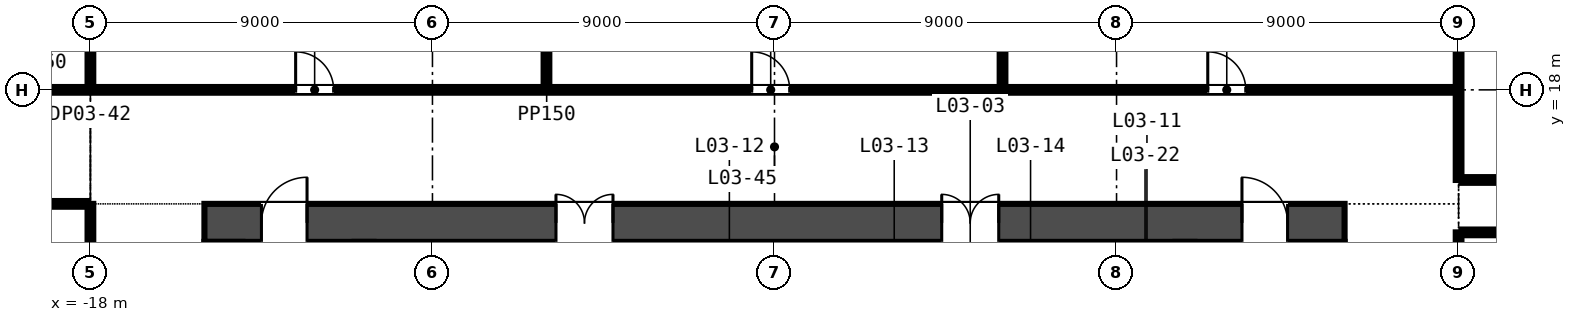
"""IFC4 building model, lengths in metres.
Left out: names, types, materials, properties, quantities, classifications, styles, units other than length and angle.
Written with IfcOpenShell. Run it as: python <this file> out.ifc"""

import sys

from ifc_helpers import new_model, si_unit, direction, frame, frame_2d, origin, place, context, subcontext, project, spatial, rectangle, extrude, element, fill, save


model = new_model("IFC4")
c1 = context("Model", 3, precision=1e-05, world=origin(), true_north=direction((0.0, 1.0)))
c2 = subcontext(c1, "Body", "Model", "MODEL_VIEW")
j1 = project(units=[si_unit("LENGTHUNIT", "METRE"), si_unit("PLANEANGLEUNIT", "RADIAN")], contexts=[c1])
p1 = place(None, origin())
s1 = spatial("IfcSite", under=j1, at=p1, CompositionType="ELEMENT")
p2 = place(p1, origin())
s2 = spatial("IfcBuilding", under=s1, at=p2, CompositionType="ELEMENT")
p3 = place(p2, frame((0.0, 0.0, 22.5)))
s3 = spatial("IfcBuildingStorey", under=s2, at=p3, CompositionType="ELEMENT", Elevation=22.5)
p4 = place(p3, frame((-15.0, 14.5, -0.3), z_axis=(0.0, 0.0, 1.0), x_axis=(1.0, 0.0, 0.0)))
e1 = element("IfcWall", 1, at=p4, inside=s3, PredefinedType="SOLIDWALL", context=c2, shape_type="SweptSolid", body=[
    extrude(rectangle(XDim=30.0, YDim=1.0, at=frame_2d((15.0, 0.0))), origin(), (0.0, 0.0, 1.0), 4.5),
])
p5 = place(p4, frame((9.25, 0.0, 0.3)))
e2 = element("IfcOpeningElement", 2, at=p5, cuts=e1, PredefinedType="OPENING", context=c2, shape_type="SweptSolid", body=[
    extrude(rectangle(XDim=1.5, YDim=2.1, at=frame_2d((0.75, 1.05))), frame((0.0, 0.51, 0.0), z_axis=(0.0, -1.0, 0.0), x_axis=(1.0, 0.0, 0.0)), (0.0, 0.0, 1.0), 1.02),
])
p6 = place(p4, frame((19.4, 0.0, 0.3)))
e3 = element("IfcOpeningElement", 3, at=p6, cuts=e1, PredefinedType="OPENING", context=c2, shape_type="SweptSolid", body=[
    extrude(rectangle(XDim=1.5, YDim=2.1, at=frame_2d((0.75, 1.05))), frame((0.0, 0.51, 0.0), z_axis=(0.0, -1.0, 0.0), x_axis=(1.0, 0.0, 0.0)), (0.0, 0.0, 1.0), 1.02),
])
p7 = place(p4, frame((1.5, 0.0, 0.3)))
e4 = element("IfcOpeningElement", 4, at=p7, cuts=e1, PredefinedType="OPENING", context=c2, shape_type="SweptSolid", body=[
    extrude(rectangle(XDim=1.2, YDim=2.1, at=frame_2d((0.6, 1.05))), frame((0.0, 0.51, 0.0), z_axis=(0.0, -1.0, 0.0), x_axis=(1.0, 0.0, 0.0)), (0.0, 0.0, 1.0), 1.02),
])
p8 = place(p4, frame((27.3, 0.0, 0.3)))
e5 = element("IfcOpeningElement", 5, at=p8, cuts=e1, PredefinedType="OPENING", context=c2, shape_type="SweptSolid", body=[
    extrude(rectangle(XDim=1.2, YDim=2.1, at=frame_2d((0.6, 1.05))), frame((0.0, 0.51, 0.0), z_axis=(0.0, -1.0, 0.0), x_axis=(1.0, 0.0, 0.0)), (0.0, 0.0, 1.0), 1.02),
])
for number, where, z_axis, x_axis in (
    (6, (-8.275, 11.3, 0.0), (0.0, 0.0, 1.0), (0.0, 1.0, 0.0)),
    (7, (-5.875, 11.3, 0.0), (0.0, 0.0, 1.0), (0.0, 1.0, 0.0)),
    (8, (-4.125, 11.3, 0.0), (0.0, 0.0, 1.0), (0.0, 1.0, 0.0)),
    (9, (-1.325, 11.3, 0.0), (0.0, 0.0, 1.0), (0.0, 1.0, 0.0)),
    (10, (1.475, 11.3, 0.0), (0.0, 0.0, 1.0), (0.0, 1.0, 0.0)),
    (11, (4.275, 11.3, 0.0), (0.0, 0.0, 1.0), (0.0, 1.0, 0.0)),
    (12, (6.025, 11.3, 0.0), (0.0, 0.0, 1.0), (0.0, 1.0, 0.0)),
    (13, (8.825, 11.3, 0.0), (0.0, 0.0, 1.0), (0.0, 1.0, 0.0)),
):
    element("IfcWall", number, at=place(p3, frame(where, z_axis=z_axis, x_axis=x_axis)), inside=s3, PredefinedType="PARTITIONING", context=c2, shape_type="SweptSolid", body=[
        extrude(rectangle(XDim=2.7, YDim=0.25, at=frame_2d((1.35, 0.0))), origin(), (0.0, 0.0, 1.0), 4.2),
    ])
p9 = place(p3, frame((18.075, 14.25, 0.0), z_axis=(0.0, 0.0, 1.0), x_axis=(1.0, 0.0, 0.0)))
e14 = element("IfcWall", 14, at=p9, inside=s3, PredefinedType="PARTITIONING", context=c2, shape_type="SweptSolid", body=[
    extrude(rectangle(XDim=5.175, YDim=0.15, at=frame_2d((2.587, 0.0))), origin(), (0.0, 0.0, 1.0), 4.2),
])
p10 = place(p3, frame((-27.035, 15.0, 0.0), z_axis=(0.0, 0.0, 1.0), x_axis=(1.0, 0.0, 0.0)))
e15 = element("IfcWall", 15, at=p10, inside=s3, PredefinedType="PARTITIONING", context=c2, shape_type="SweptSolid", body=[
    extrude(rectangle(XDim=8.96, YDim=0.15, at=frame_2d((4.48, 0.0))), origin(), (0.0, 0.0, 1.0), 4.2),
])
p11 = place(p3, frame((18.075, 15.629, 0.0), z_axis=(0.0, 0.0, 1.0), x_axis=(1.0, 0.0, 0.0)))
e16 = element("IfcWall", 16, at=p11, inside=s3, PredefinedType="PARTITIONING", context=c2, shape_type="SweptSolid", body=[
    extrude(rectangle(XDim=7.482, YDim=0.15, at=frame_2d((3.741, 0.0))), origin(), (0.0, 0.0, 1.0), 4.2),
])
p12 = place(p3, frame((-26.142, 18.0, 0.0), z_axis=(0.0, 0.0, 1.0), x_axis=(1.0, 0.0, 0.0)))
e17 = element("IfcWall", 17, at=p12, inside=s3, PredefinedType="PARTITIONING", context=c2, shape_type="SweptSolid", body=[
    extrude(rectangle(XDim=44.067, YDim=0.15, at=frame_2d((22.034, 0.0))), origin(), (0.0, 0.0, 1.0), 4.2),
])
p13 = place(p12, frame((13.542, 0.0, 0.0)))
e18 = element("IfcOpeningElement", 18, at=p13, cuts=e17, PredefinedType="OPENING", context=c2, shape_type="SweptSolid", body=[
    extrude(rectangle(XDim=1.0, YDim=2.1, at=frame_2d((0.5, 1.05))), frame((0.0, 0.085, 0.0), z_axis=(0.0, -1.0, 0.0), x_axis=(1.0, 0.0, 0.0)), (0.0, 0.0, 1.0), 0.17),
])
p14 = place(p12, frame((25.542, 0.0, 0.0)))
e19 = element("IfcOpeningElement", 19, at=p14, cuts=e17, PredefinedType="OPENING", context=c2, shape_type="SweptSolid", body=[
    extrude(rectangle(XDim=1.0, YDim=2.1, at=frame_2d((0.5, 1.05))), frame((0.0, 0.085, 0.0), z_axis=(0.0, -1.0, 0.0), x_axis=(1.0, 0.0, 0.0)), (0.0, 0.0, 1.0), 0.17),
])
p15 = place(p12, frame((37.542, 0.0, 0.0)))
e20 = element("IfcOpeningElement", 20, at=p15, cuts=e17, PredefinedType="OPENING", context=c2, shape_type="SweptSolid", body=[
    extrude(rectangle(XDim=1.0, YDim=2.1, at=frame_2d((0.5, 1.05))), frame((0.0, 0.085, 0.0), z_axis=(0.0, -1.0, 0.0), x_axis=(1.0, 0.0, 0.0)), (0.0, 0.0, 1.0), 0.17),
])
p16 = place(p3, frame((-18.0, 1.251, 0.0), z_axis=(0.0, 0.0, 1.0), x_axis=(0.0, 1.0, 0.0)))
e21 = element("IfcWall", 21, at=p16, inside=s3, PredefinedType="PARTITIONING", context=c2, shape_type="SweptSolid", body=[
    extrude(rectangle(XDim=13.749, YDim=0.15, at=frame_2d((6.875, 0.0))), origin(), (0.0, 0.0, 1.0), 4.2),
])
p17 = place(p16, frame((6.4, 0.0, 0.0)))
e22 = element("IfcOpeningElement", 22, at=p17, cuts=e21, PredefinedType="OPENING", context=c2, shape_type="SweptSolid", body=[
    extrude(rectangle(XDim=1.0, YDim=2.1, at=frame_2d((0.5, 1.05))), frame((0.0, 0.085, 0.0), z_axis=(0.0, -1.0, 0.0), x_axis=(1.0, 0.0, 0.0)), (0.0, 0.0, 1.0), 0.17),
])
p18 = place(p3, frame((-18.0, 18.075, 0.0), z_axis=(0.0, 0.0, 1.0), x_axis=(0.0, 1.0, 0.0)))
e23 = element("IfcWall", 23, at=p18, inside=s3, PredefinedType="PARTITIONING", context=c2, shape_type="SweptSolid", body=[
    extrude(rectangle(XDim=13.025, YDim=0.15, at=frame_2d((6.513, 0.0))), origin(), (0.0, 0.0, 1.0), 4.2),
])
p19 = place(p3, frame((-6.0, 18.075, 0.0), z_axis=(0.0, 0.0, 1.0), x_axis=(0.0, 1.0, 0.0)))
e24 = element("IfcWall", 24, at=p19, inside=s3, PredefinedType="PARTITIONING", context=c2, shape_type="SweptSolid", body=[
    extrude(rectangle(XDim=12.125, YDim=0.15, at=frame_2d((6.062, 0.0))), origin(), (0.0, 0.0, 1.0), 4.2),
])
p20 = place(p3, frame((6.0, 18.075, 0.0), z_axis=(0.0, 0.0, 1.0), x_axis=(0.0, 1.0, 0.0)))
e25 = element("IfcWall", 25, at=p20, inside=s3, PredefinedType="PARTITIONING", context=c2, shape_type="SweptSolid", body=[
    extrude(rectangle(XDim=13.025, YDim=0.15, at=frame_2d((6.513, 0.0))), origin(), (0.0, 0.0, 1.0), 4.2),
])
p21 = place(p3, frame((18.0, 0.0, 0.0), z_axis=(0.0, 0.0, 1.0), x_axis=(0.0, 1.0, 0.0)))
e26 = element("IfcWall", 26, at=p21, inside=s3, PredefinedType="PARTITIONING", context=c2, shape_type="SweptSolid", body=[
    extrude(rectangle(XDim=14.25, YDim=0.15, at=frame_2d((7.125, 0.0))), origin(), (0.0, 0.0, 1.0), 4.2),
])
p22 = place(p21, frame((6.65, 0.0, 0.0)))
e27 = element("IfcOpeningElement", 27, at=p22, cuts=e26, PredefinedType="OPENING", context=c2, shape_type="SweptSolid", body=[
    extrude(rectangle(XDim=1.0, YDim=2.1, at=frame_2d((0.5, 1.05))), frame((0.0, 0.085, 0.0), z_axis=(0.0, -1.0, 0.0), x_axis=(1.0, 0.0, 0.0)), (0.0, 0.0, 1.0), 0.17),
])
p23 = place(p3, frame((18.0, 15.629, 0.0), z_axis=(0.0, 0.0, 1.0), x_axis=(0.0, 1.0, 0.0)))
e28 = element("IfcWall", 28, at=p23, inside=s3, PredefinedType="PARTITIONING", context=c2, shape_type="SweptSolid", body=[
    extrude(rectangle(XDim=9.85, YDim=0.15, at=frame_2d((4.925, 0.0))), origin(), (0.0, 0.0, 1.0), 4.2),
])
p24 = place(p5, origin())
e29 = element("IfcDoor", 29, at=p24, inside=s3, OperationType="DOUBLE_DOOR_SINGLE_SWING", PredefinedType="DOOR", context=c2, shape_type="SweptSolid", body=[
    extrude(rectangle(XDim=1.5, YDim=2.1, at=frame_2d((0.75, 1.05))), frame((0.0, 0.025, 0.0), z_axis=(0.0, -1.0, 0.0), x_axis=(1.0, 0.0, 0.0)), (0.0, 0.0, 1.0), 0.05),
])
fill(e2, e29)
p25 = place(p6, origin())
e30 = element("IfcDoor", 30, at=p25, inside=s3, OperationType="DOUBLE_DOOR_SINGLE_SWING", PredefinedType="DOOR", context=c2, shape_type="SweptSolid", body=[
    extrude(rectangle(XDim=1.5, YDim=2.1, at=frame_2d((0.75, 1.05))), frame((0.0, 0.025, 0.0), z_axis=(0.0, -1.0, 0.0), x_axis=(1.0, 0.0, 0.0)), (0.0, 0.0, 1.0), 0.05),
])
fill(e3, e30)
p26 = place(p7, origin())
e31 = element("IfcDoor", 31, at=p26, inside=s3, OperationType="SINGLE_SWING_RIGHT", PredefinedType="DOOR", context=c2, shape_type="SweptSolid", body=[
    extrude(rectangle(XDim=1.2, YDim=2.1, at=frame_2d((0.6, 1.05))), frame((0.0, 0.025, 0.0), z_axis=(0.0, -1.0, 0.0), x_axis=(1.0, 0.0, 0.0)), (0.0, 0.0, 1.0), 0.05),
])
fill(e4, e31)
p27 = place(p8, origin())
e32 = element("IfcDoor", 32, at=p27, inside=s3, OperationType="SINGLE_SWING_LEFT", PredefinedType="DOOR", context=c2, shape_type="SweptSolid", body=[
    extrude(rectangle(XDim=1.2, YDim=2.1, at=frame_2d((0.6, 1.05))), frame((0.0, 0.025, 0.0), z_axis=(0.0, -1.0, 0.0), x_axis=(1.0, 0.0, 0.0)), (0.0, 0.0, 1.0), 0.05),
])
fill(e5, e32)
p28 = place(p13, origin())
e33 = element("IfcDoor", 33, at=p28, inside=s3, OperationType="SINGLE_SWING_LEFT", PredefinedType="DOOR", context=c2, shape_type="SweptSolid", body=[
    extrude(rectangle(XDim=1.0, YDim=2.1, at=frame_2d((0.5, 1.05))), frame((0.0, 0.025, 0.0), z_axis=(0.0, -1.0, 0.0), x_axis=(1.0, 0.0, 0.0)), (0.0, 0.0, 1.0), 0.05),
])
fill(e18, e33)
p29 = place(p14, origin())
e34 = element("IfcDoor", 34, at=p29, inside=s3, OperationType="SINGLE_SWING_LEFT", PredefinedType="DOOR", context=c2, shape_type="SweptSolid", body=[
    extrude(rectangle(XDim=1.0, YDim=2.1, at=frame_2d((0.5, 1.05))), frame((0.0, 0.025, 0.0), z_axis=(0.0, -1.0, 0.0), x_axis=(1.0, 0.0, 0.0)), (0.0, 0.0, 1.0), 0.05),
])
fill(e19, e34)
p30 = place(p15, origin())
e35 = element("IfcDoor", 35, at=p30, inside=s3, OperationType="SINGLE_SWING_LEFT", PredefinedType="DOOR", context=c2, shape_type="SweptSolid", body=[
    extrude(rectangle(XDim=1.0, YDim=2.1, at=frame_2d((0.5, 1.05))), frame((0.0, 0.025, 0.0), z_axis=(0.0, -1.0, 0.0), x_axis=(1.0, 0.0, 0.0)), (0.0, 0.0, 1.0), 0.05),
])
fill(e20, e35)
save(model, sys.argv[1])
